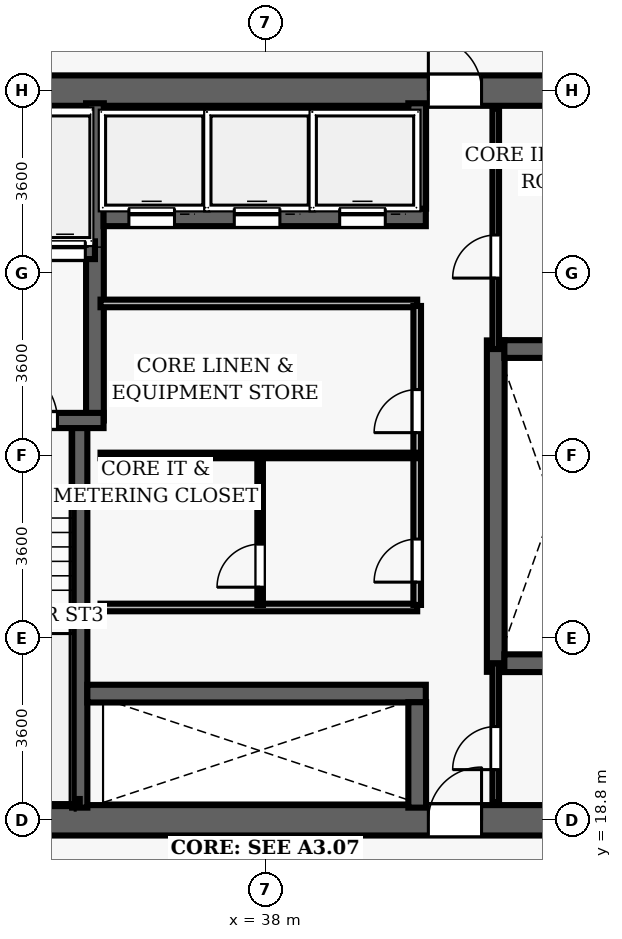
"""IFC4 building model, lengths in metres.
Left out: names, types, materials, properties, quantities, classifications, styles, units other than length and angle.
Written with IfcOpenShell. Run it as: python <this file> out.ifc"""

import sys

from ifc_helpers import new_model, si_unit, direction, frame, frame_2d, origin, place, context, subcontext, project, spatial, rectangle, extrude, element, fill, save


model = new_model("IFC4")
c1 = context("Model", 3, precision=1e-05, world=origin(), true_north=direction((0.0, 1.0)))
c2 = subcontext(c1, "Body", "Model", "MODEL_VIEW")
j1 = project(units=[si_unit("LENGTHUNIT", "METRE"), si_unit("PLANEANGLEUNIT", "RADIAN")], contexts=[c1])
p1 = place(None, origin())
s1 = spatial("IfcSite", under=j1, at=p1, CompositionType="ELEMENT")
p2 = place(p1, origin())
s2 = spatial("IfcBuilding", under=s1, at=p2, CompositionType="ELEMENT")
p3 = place(p2, frame((0.0, 0.0, 41.4)))
s3 = spatial("IfcBuildingStorey", under=s2, at=p3, CompositionType="ELEMENT", Elevation=41.4)
p4 = place(p3, frame((26.7, 18.8, 0.0), z_axis=(0.0, 0.0, 1.0), x_axis=(1.0, 0.0, 0.0)))
e1 = element("IfcWall", 1, at=p4, inside=s3, PredefinedType="SHEAR", context=c2, shape_type="SweptSolid", body=[
    extrude(rectangle(XDim=22.6, YDim=0.6, at=frame_2d((11.3, 0.0))), origin(), (0.0, 0.0, 1.0), 3.5),
])
p5 = place(p4, frame((14.52, 0.0, 0.0)))
e2 = element("IfcOpeningElement", 2, at=p5, cuts=e1, PredefinedType="OPENING", context=c2, shape_type="SweptSolid", body=[
    extrude(rectangle(XDim=1.05, YDim=2.15, at=frame_2d((0.525, 1.075))), frame((0.0, 0.31, 0.0), z_axis=(0.0, -1.0, 0.0), x_axis=(1.0, 0.0, 0.0)), (0.0, 0.0, 1.0), 0.62),
])
p6 = place(p3, frame((26.7, 33.2, 0.0), z_axis=(0.0, 0.0, 1.0), x_axis=(1.0, 0.0, 0.0)))
e3 = element("IfcWall", 3, at=p6, inside=s3, PredefinedType="SHEAR", context=c2, shape_type="SweptSolid", body=[
    extrude(rectangle(XDim=22.6, YDim=0.6, at=frame_2d((11.3, 0.0))), origin(), (0.0, 0.0, 1.0), 3.5),
])
p7 = place(p6, frame((4.62, 0.0, 0.0)))
e4 = element("IfcOpeningElement", 4, at=p7, cuts=e3, PredefinedType="OPENING", context=c2, shape_type="SweptSolid", body=[
    extrude(rectangle(XDim=1.05, YDim=2.15, at=frame_2d((0.525, 1.075))), frame((0.0, 0.31, 0.0), z_axis=(0.0, -1.0, 0.0), x_axis=(1.0, 0.0, 0.0)), (0.0, 0.0, 1.0), 0.62),
])
p8 = place(p6, frame((14.52, 0.0, 0.0)))
e5 = element("IfcOpeningElement", 5, at=p8, cuts=e3, PredefinedType="OPENING", context=c2, shape_type="SweptSolid", body=[
    extrude(rectangle(XDim=1.05, YDim=2.15, at=frame_2d((0.525, 1.075))), frame((0.0, 0.31, 0.0), z_axis=(0.0, -1.0, 0.0), x_axis=(1.0, 0.0, 0.0)), (0.0, 0.0, 1.0), 0.62),
])
p9 = place(p3, frame((34.34, 19.05, 0.0), z_axis=(0.0, 0.0, 1.0), x_axis=(0.0, 1.0, 0.0)))
e6 = element("IfcWall", 6, at=p9, inside=s3, PredefinedType="SHEAR", context=c2, shape_type="SweptSolid", body=[
    extrude(rectangle(XDim=7.5, YDim=0.3, at=frame_2d((3.75, 0.0))), origin(), (0.0, 0.0, 1.0), 3.5),
])
p10 = place(p3, frame((34.64, 26.69, 0.0), z_axis=(0.0, 0.0, 1.0), x_axis=(0.0, 1.0, 0.0)))
e7 = element("IfcWall", 7, at=p10, inside=s3, PredefinedType="SHEAR", context=c2, shape_type="SweptSolid", body=[
    extrude(rectangle(XDim=6.26, YDim=0.35, at=frame_2d((3.13, 0.0))), origin(), (0.0, 0.0, 1.0), 3.5),
])
p11 = place(p3, frame((31.25, 26.69, 0.0), z_axis=(0.0, 0.0, 1.0), x_axis=(1.0, 0.0, 0.0)))
e8 = element("IfcWall", 8, at=p11, inside=s3, PredefinedType="SHEAR", context=c2, shape_type="SweptSolid", body=[
    extrude(rectangle(XDim=3.56, YDim=0.3, at=frame_2d((1.78, 0.0))), origin(), (0.0, 0.0, 1.0), 3.5),
])
p12 = place(p11, frame((1.55, 0.0, 0.0)))
e9 = element("IfcOpeningElement", 9, at=p12, cuts=e8, PredefinedType="OPENING", context=c2, shape_type="SweptSolid", body=[
    extrude(rectangle(XDim=1.1, YDim=2.15, at=frame_2d((0.55, 1.075))), frame((0.0, 0.16, 0.0), z_axis=(0.0, -1.0, 0.0), x_axis=(1.0, 0.0, 0.0)), (0.0, 0.0, 1.0), 0.32),
])
p13 = place(p3, frame((31.3, 19.16, 0.0), z_axis=(0.0, 0.0, 1.0), x_axis=(1.0, 0.0, 0.0)))
e10 = element("IfcWall", 10, at=p13, inside=s3, PredefinedType="SHEAR", context=c2, shape_type="SweptSolid", body=[
    extrude(rectangle(XDim=3.04, YDim=0.12, at=frame_2d((1.52, 0.0))), origin(), (0.0, 0.0, 1.0), 3.5),
])
p14 = place(p3, frame((32.23, 30.05, 0.0), z_axis=(0.0, 0.0, 1.0), x_axis=(1.0, 0.0, 0.0)))
e11 = element("IfcWall", 11, at=p14, inside=s3, PredefinedType="SHEAR", context=c2, shape_type="SweptSolid", body=[
    extrude(rectangle(XDim=2.41, YDim=0.35, at=frame_2d((1.205, 0.0))), origin(), (0.0, 0.0, 1.0), 2.6),
])
p15 = place(p14, frame((0.42, 0.0, 0.0)))
e12 = element("IfcOpeningElement", 12, at=p15, cuts=e11, PredefinedType="OPENING", context=c2, shape_type="SweptSolid", body=[
    extrude(rectangle(XDim=0.8, YDim=2.15, at=frame_2d((0.4, 1.075))), frame((0.0, 0.185, 0.0), z_axis=(0.0, -1.0, 0.0), x_axis=(1.0, 0.0, 0.0)), (0.0, 0.0, 1.0), 0.37),
])
p16 = place(p14, frame((1.42, 0.0, 0.0)))
e13 = element("IfcOpeningElement", 13, at=p16, cuts=e11, PredefinedType="OPENING", context=c2, shape_type="SweptSolid", body=[
    extrude(rectangle(XDim=0.8, YDim=2.15, at=frame_2d((0.4, 1.075))), frame((0.0, 0.185, 0.0), z_axis=(0.0, -1.0, 0.0), x_axis=(1.0, 0.0, 0.0)), (0.0, 0.0, 1.0), 0.37),
])
p17 = place(p3, frame((42.55, 21.73, 0.0), z_axis=(0.0, 0.0, 1.0), x_axis=(0.0, 1.0, 0.0)))
e14 = element("IfcWall", 14, at=p17, inside=s3, PredefinedType="SHEAR", context=c2, shape_type="SweptSolid", body=[
    extrude(rectangle(XDim=6.54, YDim=0.35, at=frame_2d((3.27, 0.0))), origin(), (0.0, 0.0, 1.0), 2.6),
])
for number, where, z_axis, x_axis in (
    (15, (42.72, 21.9, 0.0), (0.0, 0.0, 1.0), (1.0, 0.0, 0.0)),
    (16, (42.72, 28.1, 0.0), (0.0, 0.0, 1.0), (1.0, 0.0, 0.0)),
):
    element("IfcWall", number, at=place(p3, frame(where, z_axis=z_axis, x_axis=x_axis)), inside=s3, PredefinedType="SHEAR", context=c2, shape_type="SweptSolid", body=[
        extrude(rectangle(XDim=2.03, YDim=0.35, at=frame_2d((1.015, 0.0))), origin(), (0.0, 0.0, 1.0), 2.6),
    ])
p18 = place(p3, frame((34.81, 30.7, 0.0), z_axis=(0.0, 0.0, 1.0), x_axis=(1.0, 0.0, 0.0)))
e17 = element("IfcWall", 17, at=p18, inside=s3, PredefinedType="SHEAR", context=c2, shape_type="SweptSolid", body=[
    extrude(rectangle(XDim=6.36, YDim=0.35, at=frame_2d((3.18, 0.0))), origin(), (0.0, 0.0, 1.0), 2.6),
])
p19 = place(p18, frame((0.5, 0.0, 0.0)))
e18 = element("IfcOpeningElement", 18, at=p19, cuts=e17, PredefinedType="OPENING", context=c2, shape_type="SweptSolid", body=[
    extrude(rectangle(XDim=0.9, YDim=2.15, at=frame_2d((0.45, 1.075))), frame((0.0, 0.185, 0.0), z_axis=(0.0, -1.0, 0.0), x_axis=(1.0, 0.0, 0.0)), (0.0, 0.0, 1.0), 0.37),
])
p20 = place(p18, frame((2.58, 0.0, 0.0)))
e19 = element("IfcOpeningElement", 19, at=p20, cuts=e17, PredefinedType="OPENING", context=c2, shape_type="SweptSolid", body=[
    extrude(rectangle(XDim=0.9, YDim=2.15, at=frame_2d((0.45, 1.075))), frame((0.0, 0.185, 0.0), z_axis=(0.0, -1.0, 0.0), x_axis=(1.0, 0.0, 0.0)), (0.0, 0.0, 1.0), 0.37),
])
p21 = place(p18, frame((4.66, 0.0, 0.0)))
e20 = element("IfcOpeningElement", 20, at=p21, cuts=e17, PredefinedType="OPENING", context=c2, shape_type="SweptSolid", body=[
    extrude(rectangle(XDim=0.9, YDim=2.15, at=frame_2d((0.45, 1.075))), frame((0.0, 0.185, 0.0), z_axis=(0.0, -1.0, 0.0), x_axis=(1.0, 0.0, 0.0)), (0.0, 0.0, 1.0), 0.37),
])
p22 = place(p3, frame((41.0, 30.87, 0.0), z_axis=(0.0, 0.0, 1.0), x_axis=(0.0, 1.0, 0.0)))
e21 = element("IfcWall", 21, at=p22, inside=s3, PredefinedType="SHEAR", context=c2, shape_type="SweptSolid", body=[
    extrude(rectangle(XDim=2.08, YDim=0.35, at=frame_2d((1.04, 0.0))), origin(), (0.0, 0.0, 1.0), 2.6),
])
p23 = place(p3, frame((34.49, 21.3, 0.0), z_axis=(0.0, 0.0, 1.0), x_axis=(1.0, 0.0, 0.0)))
e22 = element("IfcWall", 22, at=p23, inside=s3, PredefinedType="SHEAR", context=c2, shape_type="SweptSolid", body=[
    extrude(rectangle(XDim=6.68, YDim=0.35, at=frame_2d((3.34, 0.0))), origin(), (0.0, 0.0, 1.0), 2.6),
])
p24 = place(p3, frame((41.0, 19.05, 0.0), z_axis=(0.0, 0.0, 1.0), x_axis=(0.0, 1.0, 0.0)))
e23 = element("IfcWall", 23, at=p24, inside=s3, PredefinedType="SHEAR", context=c2, shape_type="SweptSolid", body=[
    extrude(rectangle(XDim=2.08, YDim=0.35, at=frame_2d((1.04, 0.0))), origin(), (0.0, 0.0, 1.0), 2.6),
])
for number, where, z_axis, x_axis in (
    (24, (34.75, 29.0, 0.0), (0.0, 0.0, 1.0), (1.0, 0.0, 0.0)),
    (25, (34.75, 23.0, 0.0), (0.0, 0.0, 1.0), (1.0, 0.0, 0.0)),
):
    element("IfcWall", number, at=place(p3, frame(where, z_axis=z_axis, x_axis=x_axis)), inside=s3, PredefinedType="PARTITIONING", context=c2, shape_type="SweptSolid", body=[
        extrude(rectangle(XDim=6.25, YDim=0.15, at=frame_2d((3.125, 0.0))), origin(), (0.0, 0.0, 1.0), 2.6),
    ])
p25 = place(p3, frame((41.0, 23.05, 0.0), z_axis=(0.0, 0.0, 1.0), x_axis=(0.0, 1.0, 0.0)))
e26 = element("IfcWall", 26, at=p25, inside=s3, PredefinedType="PARTITIONING", context=c2, shape_type="SweptSolid", body=[
    extrude(rectangle(XDim=5.9, YDim=0.15, at=frame_2d((2.95, 0.0))), origin(), (0.0, 0.0, 1.0), 2.6),
])
p26 = place(p25, frame((3.4, 0.0, 0.0)))
e27 = element("IfcOpeningElement", 27, at=p26, cuts=e26, PredefinedType="OPENING", context=c2, shape_type="SweptSolid", body=[
    extrude(rectangle(XDim=0.85, YDim=2.1, at=frame_2d((0.425, 1.05))), frame((0.0, 0.085, 0.0), z_axis=(0.0, -1.0, 0.0), x_axis=(1.0, 0.0, 0.0)), (0.0, 0.0, 1.0), 0.17),
])
p27 = place(p25, frame((0.45, 0.0, 0.0)))
e28 = element("IfcOpeningElement", 28, at=p27, cuts=e26, PredefinedType="OPENING", context=c2, shape_type="SweptSolid", body=[
    extrude(rectangle(XDim=0.85, YDim=2.1, at=frame_2d((0.425, 1.05))), frame((0.0, 0.085, 0.0), z_axis=(0.0, -1.0, 0.0), x_axis=(1.0, 0.0, 0.0)), (0.0, 0.0, 1.0), 0.17),
])
p28 = place(p3, frame((34.75, 26.0, 0.0), z_axis=(0.0, 0.0, 1.0), x_axis=(1.0, 0.0, 0.0)))
e29 = element("IfcWall", 29, at=p28, inside=s3, PredefinedType="PARTITIONING", context=c2, shape_type="SweptSolid", body=[
    extrude(rectangle(XDim=6.25, YDim=0.11, at=frame_2d((3.125, 0.0))), origin(), (0.0, 0.0, 1.0), 2.6),
])
p29 = place(p3, frame((37.9, 23.05, 0.0), z_axis=(0.0, 0.0, 1.0), x_axis=(0.0, 1.0, 0.0)))
e30 = element("IfcWall", 30, at=p29, inside=s3, PredefinedType="PARTITIONING", context=c2, shape_type="SweptSolid", body=[
    extrude(rectangle(XDim=2.95, YDim=0.11, at=frame_2d((1.475, 0.0))), origin(), (0.0, 0.0, 1.0), 2.6),
])
p30 = place(p29, frame((0.35, 0.0, 0.0)))
e31 = element("IfcOpeningElement", 31, at=p30, cuts=e30, PredefinedType="OPENING", context=c2, shape_type="SweptSolid", body=[
    extrude(rectangle(XDim=0.85, YDim=2.1, at=frame_2d((0.425, 1.05))), frame((0.0, 0.065, 0.0), z_axis=(0.0, -1.0, 0.0), x_axis=(1.0, 0.0, 0.0)), (0.0, 0.0, 1.0), 0.13),
])
p31 = place(p3, frame((42.55, 28.1, 0.0), z_axis=(0.0, 0.0, 1.0), x_axis=(0.0, 1.0, 0.0)))
e32 = element("IfcWall", 32, at=p31, inside=s3, PredefinedType="PARTITIONING", context=c2, shape_type="SweptSolid", body=[
    extrude(rectangle(XDim=4.75, YDim=0.13, at=frame_2d((2.375, 0.0))), origin(), (0.0, 0.0, 1.0), 2.6),
])
p32 = place(p31, frame((1.4, 0.0, 0.0)))
e33 = element("IfcOpeningElement", 33, at=p32, cuts=e32, PredefinedType="OPENING", context=c2, shape_type="SweptSolid", body=[
    extrude(rectangle(XDim=0.85, YDim=2.1, at=frame_2d((0.425, 1.05))), frame((0.0, 0.075, 0.0), z_axis=(0.0, -1.0, 0.0), x_axis=(1.0, 0.0, 0.0)), (0.0, 0.0, 1.0), 0.15),
])
p33 = place(p3, frame((42.55, 19.15, 0.0), z_axis=(0.0, 0.0, 1.0), x_axis=(0.0, 1.0, 0.0)))
e34 = element("IfcWall", 34, at=p33, inside=s3, PredefinedType="PARTITIONING", context=c2, shape_type="SweptSolid", body=[
    extrude(rectangle(XDim=2.75, YDim=0.13, at=frame_2d((1.375, 0.0))), origin(), (0.0, 0.0, 1.0), 2.6),
])
p34 = place(p33, frame((0.65, 0.0, 0.0)))
e35 = element("IfcOpeningElement", 35, at=p34, cuts=e34, PredefinedType="OPENING", context=c2, shape_type="SweptSolid", body=[
    extrude(rectangle(XDim=0.85, YDim=2.1, at=frame_2d((0.425, 1.05))), frame((0.0, 0.075, 0.0), z_axis=(0.0, -1.0, 0.0), x_axis=(1.0, 0.0, 0.0)), (0.0, 0.0, 1.0), 0.15),
])
p35 = place(p12, origin())
e36 = element("IfcDoor", 36, at=p35, inside=s3, OperationType="SINGLE_SWING_LEFT", PredefinedType="DOOR", context=c2, shape_type="SweptSolid", body=[
    extrude(rectangle(XDim=1.1, YDim=2.15, at=frame_2d((0.55, 1.075))), frame((0.0, 0.025, 0.0), z_axis=(0.0, -1.0, 0.0), x_axis=(1.0, 0.0, 0.0)), (0.0, 0.0, 1.0), 0.05),
])
fill(e9, e36)
p36 = place(p8, origin())
e37 = element("IfcDoor", 37, at=p36, inside=s3, OperationType="SINGLE_SWING_LEFT", PredefinedType="DOOR", context=c2, shape_type="SweptSolid", body=[
    extrude(rectangle(XDim=1.05, YDim=2.15, at=frame_2d((0.525, 1.075))), frame((0.0, 0.025, 0.0), z_axis=(0.0, -1.0, 0.0), x_axis=(1.0, 0.0, 0.0)), (0.0, 0.0, 1.0), 0.05),
])
fill(e5, e37)
p37 = place(p5, origin())
e38 = element("IfcDoor", 38, at=p37, inside=s3, OperationType="SINGLE_SWING_RIGHT", PredefinedType="DOOR", context=c2, shape_type="SweptSolid", body=[
    extrude(rectangle(XDim=1.05, YDim=2.15, at=frame_2d((0.525, 1.075))), frame((0.0, 0.025, 0.0), z_axis=(0.0, -1.0, 0.0), x_axis=(1.0, 0.0, 0.0)), (0.0, 0.0, 1.0), 0.05),
])
fill(e2, e38)
p38 = place(p26, origin())
e39 = element("IfcDoor", 39, at=p38, inside=s3, OperationType="SINGLE_SWING_LEFT", PredefinedType="DOOR", context=c2, shape_type="SweptSolid", body=[
    extrude(rectangle(XDim=0.85, YDim=2.1, at=frame_2d((0.425, 1.05))), frame((0.0, 0.025, 0.0), z_axis=(0.0, -1.0, 0.0), x_axis=(1.0, 0.0, 0.0)), (0.0, 0.0, 1.0), 0.05),
])
fill(e27, e39)
p39 = place(p27, origin())
e40 = element("IfcDoor", 40, at=p39, inside=s3, OperationType="SINGLE_SWING_LEFT", PredefinedType="DOOR", context=c2, shape_type="SweptSolid", body=[
    extrude(rectangle(XDim=0.85, YDim=2.1, at=frame_2d((0.425, 1.05))), frame((0.0, 0.025, 0.0), z_axis=(0.0, -1.0, 0.0), x_axis=(1.0, 0.0, 0.0)), (0.0, 0.0, 1.0), 0.05),
])
fill(e28, e40)
p40 = place(p30, origin())
e41 = element("IfcDoor", 41, at=p40, inside=s3, OperationType="SINGLE_SWING_LEFT", PredefinedType="DOOR", context=c2, shape_type="SweptSolid", body=[
    extrude(rectangle(XDim=0.85, YDim=2.1, at=frame_2d((0.425, 1.05))), frame((0.0, 0.025, 0.0), z_axis=(0.0, -1.0, 0.0), x_axis=(1.0, 0.0, 0.0)), (0.0, 0.0, 1.0), 0.05),
])
fill(e31, e41)
p41 = place(p32, origin())
e42 = element("IfcDoor", 42, at=p41, inside=s3, OperationType="SINGLE_SWING_LEFT", PredefinedType="DOOR", context=c2, shape_type="SweptSolid", body=[
    extrude(rectangle(XDim=0.85, YDim=2.1, at=frame_2d((0.425, 1.05))), frame((0.0, 0.025, 0.0), z_axis=(0.0, -1.0, 0.0), x_axis=(1.0, 0.0, 0.0)), (0.0, 0.0, 1.0), 0.05),
])
fill(e33, e42)
p42 = place(p34, origin())
e43 = element("IfcDoor", 43, at=p42, inside=s3, OperationType="SINGLE_SWING_LEFT", PredefinedType="DOOR", context=c2, shape_type="SweptSolid", body=[
    extrude(rectangle(XDim=0.85, YDim=2.1, at=frame_2d((0.425, 1.05))), frame((0.0, 0.025, 0.0), z_axis=(0.0, -1.0, 0.0), x_axis=(1.0, 0.0, 0.0)), (0.0, 0.0, 1.0), 0.05),
])
fill(e35, e43)
p43 = place(p19, origin())
e44 = element("IfcDoor", 44, at=p43, inside=s3, OperationType="SLIDING_TO_LEFT", PredefinedType="DOOR", context=c2, shape_type="SweptSolid", body=[
    extrude(rectangle(XDim=0.9, YDim=2.15, at=frame_2d((0.45, 1.075))), frame((0.0, 0.025, 0.0), z_axis=(0.0, -1.0, 0.0), x_axis=(1.0, 0.0, 0.0)), (0.0, 0.0, 1.0), 0.05),
])
fill(e18, e44)
p44 = place(p20, origin())
e45 = element("IfcDoor", 45, at=p44, inside=s3, OperationType="SLIDING_TO_LEFT", PredefinedType="DOOR", context=c2, shape_type="SweptSolid", body=[
    extrude(rectangle(XDim=0.9, YDim=2.15, at=frame_2d((0.45, 1.075))), frame((0.0, 0.025, 0.0), z_axis=(0.0, -1.0, 0.0), x_axis=(1.0, 0.0, 0.0)), (0.0, 0.0, 1.0), 0.05),
])
fill(e19, e45)
p45 = place(p21, origin())
e46 = element("IfcDoor", 46, at=p45, inside=s3, OperationType="SLIDING_TO_LEFT", PredefinedType="DOOR", context=c2, shape_type="SweptSolid", body=[
    extrude(rectangle(XDim=0.9, YDim=2.15, at=frame_2d((0.45, 1.075))), frame((0.0, 0.025, 0.0), z_axis=(0.0, -1.0, 0.0), x_axis=(1.0, 0.0, 0.0)), (0.0, 0.0, 1.0), 0.05),
])
fill(e20, e46)
p46 = place(p16, origin())
e47 = element("IfcDoor", 47, at=p46, inside=s3, OperationType="SLIDING_TO_LEFT", PredefinedType="DOOR", context=c2, shape_type="SweptSolid", body=[
    extrude(rectangle(XDim=0.8, YDim=2.15, at=frame_2d((0.4, 1.075))), frame((0.0, 0.025, 0.0), z_axis=(0.0, -1.0, 0.0), x_axis=(1.0, 0.0, 0.0)), (0.0, 0.0, 1.0), 0.05),
])
fill(e13, e47)
save(model, sys.argv[1])
